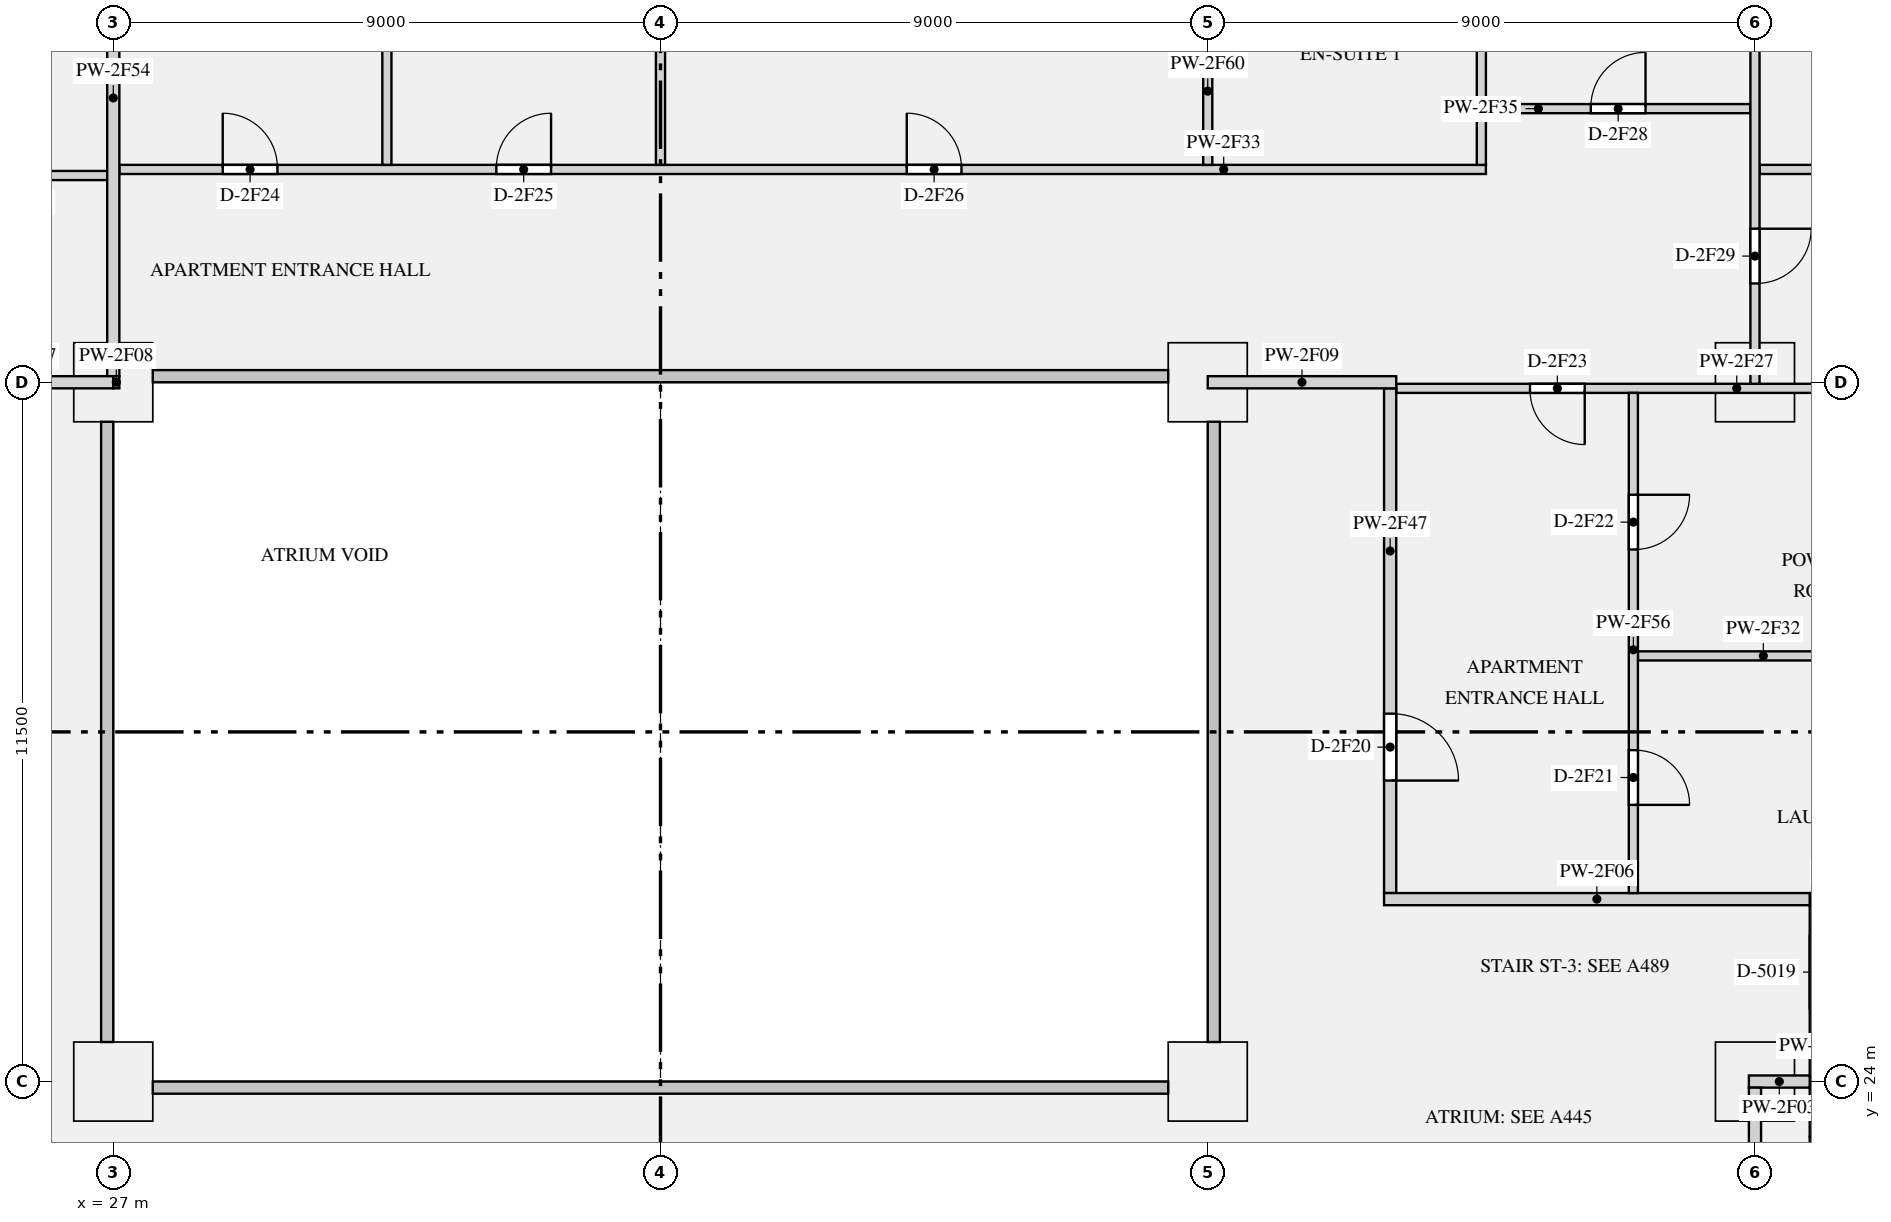
"""IFC4 building model, lengths in metres.
Left out: names, types, materials, properties, quantities, classifications, styles, units other than length and angle.
Written with IfcOpenShell. Run it as: python <this file> out.ifc"""

import sys

from ifc_helpers import new_model, si_unit, direction, frame, frame_2d, origin, origin_2d, place, context, subcontext, project, spatial, rectangle, extrude, element, fill, save


model = new_model("IFC4")
c1 = context("Model", 3, precision=1e-05, world=origin(), true_north=direction((0.0, 1.0)))
c2 = subcontext(c1, "Body", "Model", "MODEL_VIEW")
j1 = project(units=[si_unit("LENGTHUNIT", "METRE"), si_unit("PLANEANGLEUNIT", "RADIAN")], contexts=[c1])
p1 = place(None, origin())
s1 = spatial("IfcSite", under=j1, at=p1, CompositionType="ELEMENT")
p2 = place(p1, origin())
s2 = spatial("IfcBuilding", under=s1, at=p2, CompositionType="ELEMENT")
p3 = place(p2, frame((0.0, 0.0, 124.5)))
s3 = spatial("IfcBuildingStorey", under=s2, at=p3, CompositionType="ELEMENT", Elevation=124.5)
for number, where, z_axis, x_axis in (
    (1, (27.0, 24.0, 0.0), (0.0, 0.0, 1.0), (1.0, 0.0, 0.0)),
    (2, (45.0, 24.0, 0.0), (0.0, 0.0, 1.0), (1.0, 0.0, 0.0)),
    (3, (54.0, 24.0, 0.0), (0.0, 0.0, 1.0), (1.0, 0.0, 0.0)),
    (4, (27.0, 35.5, 0.0), (0.0, 0.0, 1.0), (1.0, 0.0, 0.0)),
    (5, (45.0, 35.5, 0.0), (0.0, 0.0, 1.0), (1.0, 0.0, 0.0)),
    (6, (54.0, 35.5, 0.0), (0.0, 0.0, 1.0), (1.0, 0.0, 0.0)),
):
    element("IfcColumn", number, at=place(p3, frame(where, z_axis=z_axis, x_axis=x_axis)), inside=s3, PredefinedType="COLUMN", context=c2, shape_type="SweptSolid", body=[
        extrude(rectangle(XDim=1.3, YDim=1.3, at=origin_2d()), origin(), (0.0, 0.0, 1.0), 3.15),
    ])
p4 = place(p3, frame((54.9, 23.0, 0.0), z_axis=(0.0, 0.0, 1.0), x_axis=(1.0, 0.0, 0.0)))
e7 = element("IfcWall", 7, at=p4, inside=s3, PredefinedType="PARTITIONING", context=c2, shape_type="SweptSolid", body=[
    extrude(rectangle(XDim=5.0, YDim=0.2, at=frame_2d((2.5, 0.0))), origin(), (0.0, 0.0, 1.0), 2.83),
])
p5 = place(p3, frame((54.9, 27.0, 0.0), z_axis=(0.0, 0.0, 1.0), x_axis=(1.0, 0.0, 0.0)))
e8 = element("IfcWall", 8, at=p5, inside=s3, PredefinedType="PARTITIONING", context=c2, shape_type="SweptSolid", body=[
    extrude(rectangle(XDim=1.3, YDim=0.2, at=frame_2d((0.65, 0.0))), origin(), (0.0, 0.0, 1.0), 2.83),
])
p6 = place(p3, frame((55.0, 23.1, 0.0), z_axis=(0.0, 0.0, 1.0), x_axis=(0.0, 1.0, 0.0)))
e9 = element("IfcWall", 9, at=p6, inside=s3, PredefinedType="PARTITIONING", context=c2, shape_type="SweptSolid", body=[
    extrude(rectangle(XDim=3.8, YDim=0.2, at=frame_2d((1.9, 0.0))), origin(), (0.0, 0.0, 1.0), 2.83),
])
p7 = place(p6, frame((2.1, 0.0, 0.0)))
e10 = element("IfcOpeningElement", 10, at=p7, cuts=e9, PredefinedType="OPENING", context=c2, shape_type="SweptSolid", body=[
    extrude(rectangle(XDim=1.2, YDim=2.1, at=frame_2d((0.6, 1.05))), frame((0.0, 0.11, 0.0), z_axis=(0.0, -1.0, 0.0), x_axis=(1.0, 0.0, 0.0)), (0.0, 0.0, 1.0), 0.22),
])
p8 = place(p3, frame((53.9, 24.0, 0.0), z_axis=(0.0, 0.0, 1.0), x_axis=(1.0, 0.0, 0.0)))
e11 = element("IfcWall", 11, at=p8, inside=s3, PredefinedType="PARTITIONING", context=c2, shape_type="SweptSolid", body=[
    extrude(rectangle(XDim=1.0, YDim=0.2, at=frame_2d((0.5, 0.0))), origin(), (0.0, 0.0, 1.0), 2.83),
])
p9 = place(p3, frame((47.9, 27.0, 0.0), z_axis=(0.0, 0.0, 1.0), x_axis=(1.0, 0.0, 0.0)))
e12 = element("IfcWall", 12, at=p9, inside=s3, PredefinedType="PARTITIONING", context=c2, shape_type="SweptSolid", body=[
    extrude(rectangle(XDim=7.0, YDim=0.2, at=frame_2d((3.5, 0.0))), origin(), (0.0, 0.0, 1.0), 2.83),
])
p10 = place(p3, frame((23.9, 35.5, 0.0), z_axis=(0.0, 0.0, 1.0), x_axis=(1.0, 0.0, 0.0)))
e13 = element("IfcWall", 13, at=p10, inside=s3, PredefinedType="PARTITIONING", context=c2, shape_type="SweptSolid", body=[
    extrude(rectangle(XDim=3.1, YDim=0.2, at=frame_2d((1.55, 0.0))), origin(), (0.0, 0.0, 1.0), 2.83),
])
p11 = place(p3, frame((27.0, 35.5, 0.0), z_axis=(0.0, 0.0, 1.0), x_axis=(1.0, 0.0, 0.0)))
e14 = element("IfcWall", 14, at=p11, inside=s3, PredefinedType="PARTITIONING", context=c2, shape_type="SweptSolid", body=[
    extrude(rectangle(XDim=0.1, YDim=0.2, at=frame_2d((0.05, 0.0))), origin(), (0.0, 0.0, 1.0), 2.83),
])
p12 = place(p3, frame((45.0, 35.5, 0.0), z_axis=(0.0, 0.0, 1.0), x_axis=(1.0, 0.0, 0.0)))
e15 = element("IfcWall", 15, at=p12, inside=s3, PredefinedType="PARTITIONING", context=c2, shape_type="SweptSolid", body=[
    extrude(rectangle(XDim=3.1, YDim=0.2, at=frame_2d((1.55, 0.0))), origin(), (0.0, 0.0, 1.0), 2.83),
])
p13 = place(p3, frame((12.125, 38.9, 0.0), z_axis=(0.0, 0.0, 1.0), x_axis=(1.0, 0.0, 0.0)))
e16 = element("IfcWall", 16, at=p13, inside=s3, PredefinedType="PARTITIONING", context=c2, shape_type="SweptSolid", body=[
    extrude(rectangle(XDim=14.775, YDim=0.15, at=frame_2d((7.387, 0.0))), origin(), (0.0, 0.0, 1.0), 2.83),
])
p14 = place(p13, frame((3.175, 0.0, 0.0)))
e17 = element("IfcOpeningElement", 17, at=p14, cuts=e16, PredefinedType="OPENING", context=c2, shape_type="SweptSolid", body=[
    extrude(rectangle(XDim=0.9, YDim=2.1, at=frame_2d((0.45, 1.05))), frame((0.0, 0.085, 0.0), z_axis=(0.0, -1.0, 0.0), x_axis=(1.0, 0.0, 0.0)), (0.0, 0.0, 1.0), 0.17),
])
p15 = place(p13, frame((12.925, 0.0, 0.0)))
e18 = element("IfcOpeningElement", 18, at=p15, cuts=e16, PredefinedType="OPENING", context=c2, shape_type="SweptSolid", body=[
    extrude(rectangle(XDim=0.9, YDim=2.1, at=frame_2d((0.45, 1.05))), frame((0.0, 0.085, 0.0), z_axis=(0.0, -1.0, 0.0), x_axis=(1.0, 0.0, 0.0)), (0.0, 0.0, 1.0), 0.17),
])
p16 = place(p3, frame((48.1, 35.4, 0.0), z_axis=(0.0, 0.0, 1.0), x_axis=(1.0, 0.0, 0.0)))
e19 = element("IfcWall", 19, at=p16, inside=s3, PredefinedType="PARTITIONING", context=c2, shape_type="SweptSolid", body=[
    extrude(rectangle(XDim=8.1, YDim=0.15, at=frame_2d((4.05, 0.0))), origin(), (0.0, 0.0, 1.0), 2.83),
])
p17 = place(p16, frame((2.2, 0.0, 0.0)))
e20 = element("IfcOpeningElement", 20, at=p17, cuts=e19, PredefinedType="OPENING", context=c2, shape_type="SweptSolid", body=[
    extrude(rectangle(XDim=0.9, YDim=2.1, at=frame_2d((0.45, 1.05))), frame((0.0, 0.085, 0.0), z_axis=(0.0, -1.0, 0.0), x_axis=(1.0, 0.0, 0.0)), (0.0, 0.0, 1.0), 0.17),
])
p18 = place(p3, frame((52.075, 31.0, 0.0), z_axis=(0.0, 0.0, 1.0), x_axis=(1.0, 0.0, 0.0)))
e21 = element("IfcWall", 21, at=p18, inside=s3, PredefinedType="PARTITIONING", context=c2, shape_type="SweptSolid", body=[
    extrude(rectangle(XDim=4.125, YDim=0.15, at=frame_2d((2.062, 0.0))), origin(), (0.0, 0.0, 1.0), 2.83),
])
p19 = place(p3, frame((27.1, 39.0, 0.0), z_axis=(0.0, 0.0, 1.0), x_axis=(1.0, 0.0, 0.0)))
e22 = element("IfcWall", 22, at=p19, inside=s3, PredefinedType="PARTITIONING", context=c2, shape_type="SweptSolid", body=[
    extrude(rectangle(XDim=22.475, YDim=0.15, at=frame_2d((11.237, 0.0))), origin(), (0.0, 0.0, 1.0), 2.83),
])
p20 = place(p19, frame((1.7, 0.0, 0.0)))
e23 = element("IfcOpeningElement", 23, at=p20, cuts=e22, PredefinedType="OPENING", context=c2, shape_type="SweptSolid", body=[
    extrude(rectangle(XDim=0.9, YDim=2.1, at=frame_2d((0.45, 1.05))), frame((0.0, 0.085, 0.0), z_axis=(0.0, -1.0, 0.0), x_axis=(1.0, 0.0, 0.0)), (0.0, 0.0, 1.0), 0.17),
])
p21 = place(p19, frame((6.2, 0.0, 0.0)))
e24 = element("IfcOpeningElement", 24, at=p21, cuts=e22, PredefinedType="OPENING", context=c2, shape_type="SweptSolid", body=[
    extrude(rectangle(XDim=0.9, YDim=2.1, at=frame_2d((0.45, 1.05))), frame((0.0, 0.085, 0.0), z_axis=(0.0, -1.0, 0.0), x_axis=(1.0, 0.0, 0.0)), (0.0, 0.0, 1.0), 0.17),
])
p22 = place(p19, frame((12.95, 0.0, 0.0)))
e25 = element("IfcOpeningElement", 25, at=p22, cuts=e22, PredefinedType="OPENING", context=c2, shape_type="SweptSolid", body=[
    extrude(rectangle(XDim=0.9, YDim=2.1, at=frame_2d((0.45, 1.05))), frame((0.0, 0.085, 0.0), z_axis=(0.0, -1.0, 0.0), x_axis=(1.0, 0.0, 0.0)), (0.0, 0.0, 1.0), 0.17),
])
p23 = place(p3, frame((54.075, 39.0, 0.0), z_axis=(0.0, 0.0, 1.0), x_axis=(1.0, 0.0, 0.0)))
e26 = element("IfcWall", 26, at=p23, inside=s3, PredefinedType="PARTITIONING", context=c2, shape_type="SweptSolid", body=[
    extrude(rectangle(XDim=8.85, YDim=0.15, at=frame_2d((4.425, 0.0))), origin(), (0.0, 0.0, 1.0), 2.83),
])
p24 = place(p23, frame((3.975, 0.0, 0.0)))
e27 = element("IfcOpeningElement", 27, at=p24, cuts=e26, PredefinedType="OPENING", context=c2, shape_type="SweptSolid", body=[
    extrude(rectangle(XDim=0.9, YDim=2.1, at=frame_2d((0.45, 1.05))), frame((0.0, 0.085, 0.0), z_axis=(0.0, -1.0, 0.0), x_axis=(1.0, 0.0, 0.0)), (0.0, 0.0, 1.0), 0.17),
])
p25 = place(p3, frame((49.575, 40.0, 0.0), z_axis=(0.0, 0.0, 1.0), x_axis=(1.0, 0.0, 0.0)))
e28 = element("IfcWall", 28, at=p25, inside=s3, PredefinedType="PARTITIONING", context=c2, shape_type="SweptSolid", body=[
    extrude(rectangle(XDim=4.35, YDim=0.15, at=frame_2d((2.175, 0.0))), origin(), (0.0, 0.0, 1.0), 2.83),
])
p26 = place(p25, frame((1.725, 0.0, 0.0)))
e29 = element("IfcOpeningElement", 29, at=p26, cuts=e28, PredefinedType="OPENING", context=c2, shape_type="SweptSolid", body=[
    extrude(rectangle(XDim=0.9, YDim=2.1, at=frame_2d((0.45, 1.05))), frame((0.0, 0.085, 0.0), z_axis=(0.0, -1.0, 0.0), x_axis=(1.0, 0.0, 0.0)), (0.0, 0.0, 1.0), 0.17),
])
p27 = place(p3, frame((54.0, 35.475, 0.0), z_axis=(0.0, 0.0, 1.0), x_axis=(0.0, 1.0, 0.0)))
e30 = element("IfcWall", 30, at=p27, inside=s3, PredefinedType="PARTITIONING", context=c2, shape_type="SweptSolid", body=[
    extrude(rectangle(XDim=9.275, YDim=0.15, at=frame_2d((4.637, 0.0))), origin(), (0.0, 0.0, 1.0), 2.83),
])
p28 = place(p27, frame((1.65, 0.0, 0.0)))
e31 = element("IfcOpeningElement", 31, at=p28, cuts=e30, PredefinedType="OPENING", context=c2, shape_type="SweptSolid", body=[
    extrude(rectangle(XDim=0.9, YDim=2.1, at=frame_2d((0.45, 1.05))), frame((0.0, 0.085, 0.0), z_axis=(0.0, -1.0, 0.0), x_axis=(1.0, 0.0, 0.0)), (0.0, 0.0, 1.0), 0.17),
])
p29 = place(p3, frame((54.0, 16.1, 0.0), z_axis=(0.0, 0.0, 1.0), x_axis=(0.0, 1.0, 0.0)))
e32 = element("IfcWall", 32, at=p29, inside=s3, PredefinedType="PARTITIONING", context=c2, shape_type="SweptSolid", body=[
    extrude(rectangle(XDim=7.8, YDim=0.2, at=frame_2d((3.9, 0.0))), origin(), (0.0, 0.0, 1.0), 2.83),
])
p30 = place(p29, frame((2.35, 0.0, 0.0)))
e33 = element("IfcOpeningElement", 33, at=p30, cuts=e32, PredefinedType="OPENING", context=c2, shape_type="SweptSolid", body=[
    extrude(rectangle(XDim=1.1, YDim=2.1, at=frame_2d((0.55, 1.05))), frame((0.0, 0.11, 0.0), z_axis=(0.0, -1.0, 0.0), x_axis=(1.0, 0.0, 0.0)), (0.0, 0.0, 1.0), 0.22),
])
p31 = place(p3, frame((48.0, 27.1, 0.0), z_axis=(0.0, 0.0, 1.0), x_axis=(0.0, 1.0, 0.0)))
e34 = element("IfcWall", 34, at=p31, inside=s3, PredefinedType="PARTITIONING", context=c2, shape_type="SweptSolid", body=[
    extrude(rectangle(XDim=8.3, YDim=0.2, at=frame_2d((4.15, 0.0))), origin(), (0.0, 0.0, 1.0), 2.83),
])
p32 = place(p31, frame((1.85, 0.0, 0.0)))
e35 = element("IfcOpeningElement", 35, at=p32, cuts=e34, PredefinedType="OPENING", context=c2, shape_type="SweptSolid", body=[
    extrude(rectangle(XDim=1.1, YDim=2.1, at=frame_2d((0.55, 1.05))), frame((0.0, 0.11, 0.0), z_axis=(0.0, -1.0, 0.0), x_axis=(1.0, 0.0, 0.0)), (0.0, 0.0, 1.0), 0.22),
])
p33 = place(p3, frame((27.0, 35.6, 0.0), z_axis=(0.0, 0.0, 1.0), x_axis=(0.0, 1.0, 0.0)))
e36 = element("IfcWall", 36, at=p33, inside=s3, PredefinedType="PARTITIONING", context=c2, shape_type="SweptSolid", body=[
    extrude(rectangle(XDim=9.15, YDim=0.2, at=frame_2d((4.575, 0.0))), origin(), (0.0, 0.0, 1.0), 2.83),
])
p34 = place(p3, frame((52.0, 27.1, 0.0), z_axis=(0.0, 0.0, 1.0), x_axis=(0.0, 1.0, 0.0)))
e37 = element("IfcWall", 37, at=p34, inside=s3, PredefinedType="PARTITIONING", context=c2, shape_type="SweptSolid", body=[
    extrude(rectangle(XDim=8.225, YDim=0.15, at=frame_2d((4.112, 0.0))), origin(), (0.0, 0.0, 1.0), 2.83),
])
p35 = place(p34, frame((1.45, 0.0, 0.0)))
e38 = element("IfcOpeningElement", 38, at=p35, cuts=e37, PredefinedType="OPENING", context=c2, shape_type="SweptSolid", body=[
    extrude(rectangle(XDim=0.9, YDim=2.1, at=frame_2d((0.45, 1.05))), frame((0.0, 0.085, 0.0), z_axis=(0.0, -1.0, 0.0), x_axis=(1.0, 0.0, 0.0)), (0.0, 0.0, 1.0), 0.17),
])
p36 = place(p34, frame((5.65, 0.0, 0.0)))
e39 = element("IfcOpeningElement", 39, at=p36, cuts=e37, PredefinedType="OPENING", context=c2, shape_type="SweptSolid", body=[
    extrude(rectangle(XDim=0.9, YDim=2.1, at=frame_2d((0.45, 1.05))), frame((0.0, 0.085, 0.0), z_axis=(0.0, -1.0, 0.0), x_axis=(1.0, 0.0, 0.0)), (0.0, 0.0, 1.0), 0.17),
])
for number, where, z_axis, x_axis in (
    (40, (49.5, 39.075, 0.0), (0.0, 0.0, 1.0), (0.0, 1.0, 0.0)),
    (41, (31.5, 39.075, 0.0), (0.0, 0.0, 1.0), (0.0, 1.0, 0.0)),
    (42, (36.0, 39.075, 0.0), (0.0, 0.0, 1.0), (0.0, 1.0, 0.0)),
):
    element("IfcWall", number, at=place(p3, frame(where, z_axis=z_axis, x_axis=x_axis)), inside=s3, PredefinedType="PARTITIONING", context=c2, shape_type="SweptSolid", body=[
        extrude(rectangle(XDim=5.675, YDim=0.15, at=frame_2d((2.837, 0.0))), origin(), (0.0, 0.0, 1.0), 2.83),
    ])
p37 = place(p3, frame((45.0, 39.075, 0.0), z_axis=(0.0, 0.0, 1.0), x_axis=(0.0, 1.0, 0.0)))
e43 = element("IfcWall", 43, at=p37, inside=s3, PredefinedType="PARTITIONING", context=c2, shape_type="SweptSolid", body=[
    extrude(rectangle(XDim=5.675, YDim=0.15, at=frame_2d((2.837, 0.0))), origin(), (0.0, 0.0, 1.0), 2.83),
])
p38 = place(p37, frame((2.425, 0.0, 0.0)))
e44 = element("IfcOpeningElement", 44, at=p38, cuts=e43, PredefinedType="OPENING", context=c2, shape_type="SweptSolid", body=[
    extrude(rectangle(XDim=0.9, YDim=2.1, at=frame_2d((0.45, 1.05))), frame((0.0, 0.085, 0.0), z_axis=(0.0, -1.0, 0.0), x_axis=(1.0, 0.0, 0.0)), (0.0, 0.0, 1.0), 0.17),
])
p39 = place(p32, frame((1.1, 0.0, 0.0), z_axis=(0.0, 0.0, 1.0), x_axis=(-1.0, 0.0, 0.0)))
e45 = element("IfcDoor", 45, at=p39, inside=s3, OperationType="SINGLE_SWING_RIGHT", PredefinedType="DOOR", context=c2, shape_type="SweptSolid", body=[
    extrude(rectangle(XDim=1.1, YDim=2.1, at=frame_2d((0.55, 1.05))), frame((0.0, 0.025, 0.0), z_axis=(0.0, -1.0, 0.0), x_axis=(1.0, 0.0, 0.0)), (0.0, 0.0, 1.0), 0.05),
])
fill(e35, e45)
p40 = place(p35, frame((0.9, 0.0, 0.0), z_axis=(0.0, 0.0, 1.0), x_axis=(-1.0, 0.0, 0.0)))
e46 = element("IfcDoor", 46, at=p40, inside=s3, OperationType="SINGLE_SWING_RIGHT", PredefinedType="DOOR", context=c2, shape_type="SweptSolid", body=[
    extrude(rectangle(XDim=0.9, YDim=2.1, at=frame_2d((0.45, 1.05))), frame((0.0, 0.025, 0.0), z_axis=(0.0, -1.0, 0.0), x_axis=(1.0, 0.0, 0.0)), (0.0, 0.0, 1.0), 0.05),
])
fill(e38, e46)
p41 = place(p36, frame((0.9, 0.0, 0.0), z_axis=(0.0, 0.0, 1.0), x_axis=(-1.0, 0.0, 0.0)))
e47 = element("IfcDoor", 47, at=p41, inside=s3, OperationType="SINGLE_SWING_LEFT", PredefinedType="DOOR", context=c2, shape_type="SweptSolid", body=[
    extrude(rectangle(XDim=0.9, YDim=2.1, at=frame_2d((0.45, 1.05))), frame((0.0, 0.025, 0.0), z_axis=(0.0, -1.0, 0.0), x_axis=(1.0, 0.0, 0.0)), (0.0, 0.0, 1.0), 0.05),
])
fill(e39, e47)
p42 = place(p17, frame((0.9, 0.0, 0.0), z_axis=(0.0, 0.0, 1.0), x_axis=(-1.0, 0.0, 0.0)))
e48 = element("IfcDoor", 48, at=p42, inside=s3, OperationType="SINGLE_SWING_LEFT", PredefinedType="DOOR", context=c2, shape_type="SweptSolid", body=[
    extrude(rectangle(XDim=0.9, YDim=2.1, at=frame_2d((0.45, 1.05))), frame((0.0, 0.025, 0.0), z_axis=(0.0, -1.0, 0.0), x_axis=(1.0, 0.0, 0.0)), (0.0, 0.0, 1.0), 0.05),
])
fill(e20, e48)
p43 = place(p20, origin())
e49 = element("IfcDoor", 49, at=p43, inside=s3, OperationType="SINGLE_SWING_LEFT", PredefinedType="DOOR", context=c2, shape_type="SweptSolid", body=[
    extrude(rectangle(XDim=0.9, YDim=2.1, at=frame_2d((0.45, 1.05))), frame((0.0, 0.025, 0.0), z_axis=(0.0, -1.0, 0.0), x_axis=(1.0, 0.0, 0.0)), (0.0, 0.0, 1.0), 0.05),
])
fill(e23, e49)
p44 = place(p21, origin())
e50 = element("IfcDoor", 50, at=p44, inside=s3, OperationType="SINGLE_SWING_RIGHT", PredefinedType="DOOR", context=c2, shape_type="SweptSolid", body=[
    extrude(rectangle(XDim=0.9, YDim=2.1, at=frame_2d((0.45, 1.05))), frame((0.0, 0.025, 0.0), z_axis=(0.0, -1.0, 0.0), x_axis=(1.0, 0.0, 0.0)), (0.0, 0.0, 1.0), 0.05),
])
fill(e24, e50)
p45 = place(p22, origin())
e51 = element("IfcDoor", 51, at=p45, inside=s3, OperationType="SINGLE_SWING_LEFT", PredefinedType="DOOR", context=c2, shape_type="SweptSolid", body=[
    extrude(rectangle(XDim=0.9, YDim=2.1, at=frame_2d((0.45, 1.05))), frame((0.0, 0.025, 0.0), z_axis=(0.0, -1.0, 0.0), x_axis=(1.0, 0.0, 0.0)), (0.0, 0.0, 1.0), 0.05),
])
fill(e25, e51)
p46 = place(p26, origin())
e52 = element("IfcDoor", 52, at=p46, inside=s3, OperationType="SINGLE_SWING_RIGHT", PredefinedType="DOOR", context=c2, shape_type="SweptSolid", body=[
    extrude(rectangle(XDim=0.9, YDim=2.1, at=frame_2d((0.45, 1.05))), frame((0.0, 0.025, 0.0), z_axis=(0.0, -1.0, 0.0), x_axis=(1.0, 0.0, 0.0)), (0.0, 0.0, 1.0), 0.05),
])
fill(e29, e52)
p47 = place(p28, frame((0.9, 0.0, 0.0), z_axis=(0.0, 0.0, 1.0), x_axis=(-1.0, 0.0, 0.0)))
e53 = element("IfcDoor", 53, at=p47, inside=s3, OperationType="SINGLE_SWING_LEFT", PredefinedType="DOOR", context=c2, shape_type="SweptSolid", body=[
    extrude(rectangle(XDim=0.9, YDim=2.1, at=frame_2d((0.45, 1.05))), frame((0.0, 0.025, 0.0), z_axis=(0.0, -1.0, 0.0), x_axis=(1.0, 0.0, 0.0)), (0.0, 0.0, 1.0), 0.05),
])
fill(e31, e53)
save(model, sys.argv[1])
